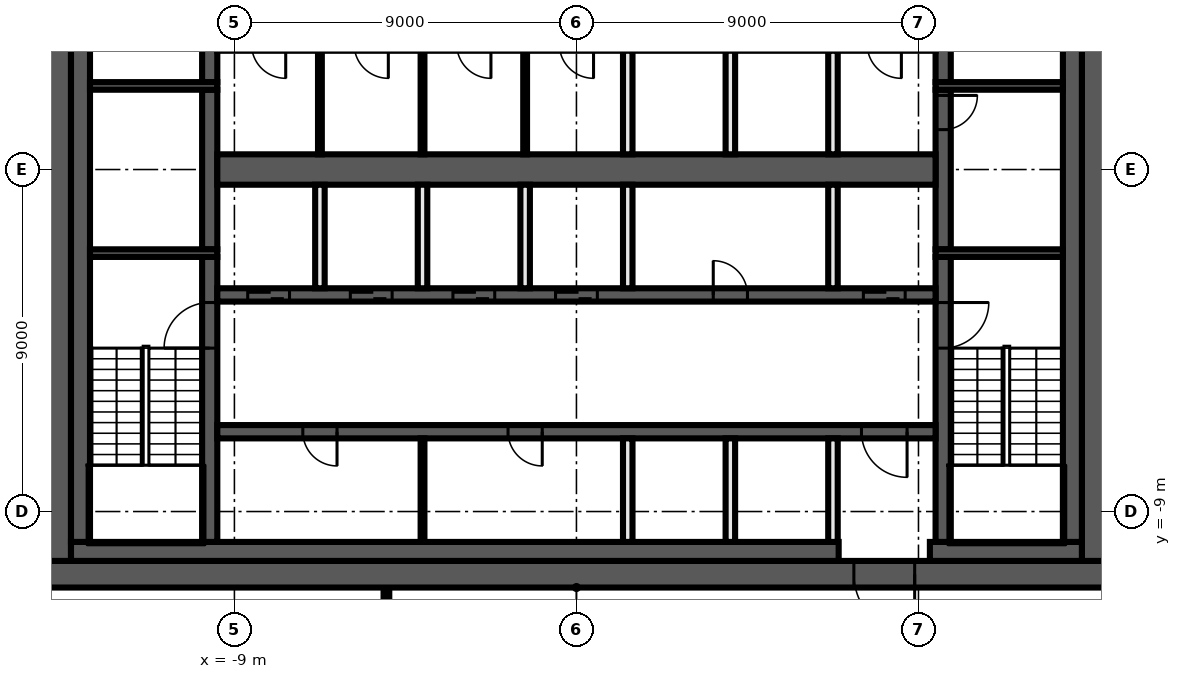
"""IFC4 building model, lengths in metres.
Left out: names, types, materials, properties, quantities, classifications, styles, units other than length and angle.
Written with IfcOpenShell. Run it as: python <this file> out.ifc"""

import sys

from ifc_helpers import new_model, si_unit, direction, frame, frame_2d, origin, place, context, subcontext, project, spatial, rectangle, extrude, element, fill, save


model = new_model("IFC4")
c1 = context("Model", 3, precision=1e-05, world=origin(), true_north=direction((0.0, 1.0)))
c2 = subcontext(c1, "Body", "Model", "MODEL_VIEW")
j1 = project(units=[si_unit("LENGTHUNIT", "METRE"), si_unit("PLANEANGLEUNIT", "RADIAN")], contexts=[c1])
p1 = place(None, origin())
s1 = spatial("IfcSite", under=j1, at=p1, CompositionType="ELEMENT")
p2 = place(p1, origin())
s2 = spatial("IfcBuilding", under=s1, at=p2, CompositionType="ELEMENT")
p3 = place(p2, frame((0.0, 0.0, 266.4)))
s3 = spatial("IfcBuildingStorey", under=s2, at=p3, CompositionType="ELEMENT", Elevation=266.4)
p4 = place(p3, frame((-5.0, -14.125, 0.0), z_axis=(0.0, 0.0, 1.0), x_axis=(0.0, 1.0, 0.0)))
e1 = element("IfcWall", 1, at=p4, inside=s3, PredefinedType="PARTITIONING", context=c2, shape_type="SweptSolid", body=[
    extrude(rectangle(XDim=3.125, YDim=0.15, at=frame_2d((1.562, 0.0))), origin(), (0.0, 0.0, 1.0), 3.82),
])
p5 = place(p3, frame((14.0, -10.65, 0.0), z_axis=(0.0, 0.0, 1.0), x_axis=(-1.0, 0.0, 0.0)))
e2 = element("IfcWall", 2, at=p5, inside=s3, PredefinedType="SHEAR", context=c2, shape_type="SweptSolid", body=[
    extrude(rectangle(XDim=28.0, YDim=0.7, at=frame_2d((14.0, 0.0))), origin(), (0.0, 0.0, 1.0), 3.82),
])
p6 = place(p5, frame((5.1, 0.0, 0.0)))
e3 = element("IfcOpeningElement", 3, at=p6, cuts=e2, PredefinedType="OPENING", context=c2, shape_type="SweptSolid", body=[
    extrude(rectangle(XDim=1.6, YDim=2.1, at=frame_2d((0.8, 1.05))), frame((0.0, 0.36, 0.0), z_axis=(0.0, -1.0, 0.0), x_axis=(1.0, 0.0, 0.0)), (0.0, 0.0, 1.0), 0.72),
])
for number, where, z_axis, x_axis in (
    (4, (13.65, 10.3, 0.0), (0.0, 0.0, 1.0), (0.0, -1.0, 0.0)),
    (5, (-13.65, -10.3, 0.0), (0.0, 0.0, 1.0), (0.0, 1.0, 0.0)),
):
    element("IfcWall", number, at=place(p3, frame(where, z_axis=z_axis, x_axis=x_axis)), inside=s3, PredefinedType="SHEAR", context=c2, shape_type="SweptSolid", body=[
        extrude(rectangle(XDim=20.6, YDim=0.7, at=frame_2d((10.3, 0.0))), origin(), (0.0, 0.0, 1.0), 3.82),
    ])
p7 = place(p3, frame((13.3, -10.05, 0.0), z_axis=(0.0, 0.0, 1.0), x_axis=(-1.0, 0.0, 0.0)))
e6 = element("IfcWall", 6, at=p7, inside=s3, PredefinedType="SHEAR", context=c2, shape_type="SweptSolid", body=[
    extrude(rectangle(XDim=4.0, YDim=0.5, at=frame_2d((2.0, 0.0))), origin(), (0.0, 0.0, 1.0), 3.82),
])
p8 = place(p3, frame((6.9, -10.05, 0.0), z_axis=(0.0, 0.0, 1.0), x_axis=(-1.0, 0.0, 0.0)))
e7 = element("IfcWall", 7, at=p8, inside=s3, PredefinedType="SHEAR", context=c2, shape_type="SweptSolid", body=[
    extrude(rectangle(XDim=20.2, YDim=0.5, at=frame_2d((10.1, 0.0))), origin(), (0.0, 0.0, 1.0), 3.82),
])
for number, where, z_axis, x_axis in (
    (8, (13.05, 9.8, 0.0), (0.0, 0.0, 1.0), (0.0, -1.0, 0.0)),
    (9, (-13.05, -9.8, 0.0), (0.0, 0.0, 1.0), (0.0, 1.0, 0.0)),
):
    element("IfcWall", number, at=place(p3, frame(where, z_axis=z_axis, x_axis=x_axis)), inside=s3, PredefinedType="SHEAR", context=c2, shape_type="SweptSolid", body=[
        extrude(rectangle(XDim=19.6, YDim=0.5, at=frame_2d((9.8, 0.0))), origin(), (0.0, 0.0, 1.0), 3.82),
    ])
p9 = place(p3, frame((9.65, -2.3, 0.0), z_axis=(0.0, 0.0, 1.0), x_axis=(0.0, -1.0, 0.0)))
e10 = element("IfcWall", 10, at=p9, inside=s3, PredefinedType="SHEAR", context=c2, shape_type="SweptSolid", body=[
    extrude(rectangle(XDim=7.5, YDim=0.4, at=frame_2d((3.75, 0.0))), origin(), (0.0, 0.0, 1.0), 3.82),
])
p10 = place(p9, frame((1.2, 0.0, 0.0)))
e11 = element("IfcOpeningElement", 11, at=p10, cuts=e10, PredefinedType="OPENING", context=c2, shape_type="SweptSolid", body=[
    extrude(rectangle(XDim=1.2, YDim=2.1, at=frame_2d((0.6, 1.05))), frame((0.0, 0.21, 0.0), z_axis=(0.0, -1.0, 0.0), x_axis=(1.0, 0.0, 0.0)), (0.0, 0.0, 1.0), 0.42),
])
p11 = place(p3, frame((9.65, 2.1, 0.0), z_axis=(0.0, 0.0, 1.0), x_axis=(0.0, -1.0, 0.0)))
e12 = element("IfcWall", 12, at=p11, inside=s3, PredefinedType="SHEAR", context=c2, shape_type="SweptSolid", body=[
    extrude(rectangle(XDim=4.2, YDim=0.4, at=frame_2d((2.1, 0.0))), origin(), (0.0, 0.0, 1.0), 3.82),
])
p12 = place(p11, frame((0.15, 0.0, 0.0)))
e13 = element("IfcOpeningElement", 13, at=p12, cuts=e12, PredefinedType="OPENING", context=c2, shape_type="SweptSolid", body=[
    extrude(rectangle(XDim=0.9, YDim=2.1, at=frame_2d((0.45, 1.05))), frame((0.0, 0.21, 0.0), z_axis=(0.0, -1.0, 0.0), x_axis=(1.0, 0.0, 0.0)), (0.0, 0.0, 1.0), 0.42),
])
p13 = place(p3, frame((9.65, 9.8, 0.0), z_axis=(0.0, 0.0, 1.0), x_axis=(0.0, -1.0, 0.0)))
e14 = element("IfcWall", 14, at=p13, inside=s3, PredefinedType="SHEAR", context=c2, shape_type="SweptSolid", body=[
    extrude(rectangle(XDim=7.5, YDim=0.4, at=frame_2d((3.75, 0.0))), origin(), (0.0, 0.0, 1.0), 3.82),
])
p14 = place(p13, frame((5.1, 0.0, 0.0)))
e15 = element("IfcOpeningElement", 15, at=p14, cuts=e14, PredefinedType="OPENING", context=c2, shape_type="SweptSolid", body=[
    extrude(rectangle(XDim=1.2, YDim=2.1, at=frame_2d((0.6, 1.05))), frame((0.0, 0.21, 0.0), z_axis=(0.0, -1.0, 0.0), x_axis=(1.0, 0.0, 0.0)), (0.0, 0.0, 1.0), 0.42),
])
p15 = place(p3, frame((-9.65, -9.8, 0.0), z_axis=(0.0, 0.0, 1.0), x_axis=(0.0, 1.0, 0.0)))
e16 = element("IfcWall", 16, at=p15, inside=s3, PredefinedType="SHEAR", context=c2, shape_type="SweptSolid", body=[
    extrude(rectangle(XDim=7.5, YDim=0.4, at=frame_2d((3.75, 0.0))), origin(), (0.0, 0.0, 1.0), 3.82),
])
p16 = place(p15, frame((5.1, 0.0, 0.0)))
e17 = element("IfcOpeningElement", 17, at=p16, cuts=e16, PredefinedType="OPENING", context=c2, shape_type="SweptSolid", body=[
    extrude(rectangle(XDim=1.2, YDim=2.1, at=frame_2d((0.6, 1.05))), frame((0.0, 0.21, 0.0), z_axis=(0.0, -1.0, 0.0), x_axis=(1.0, 0.0, 0.0)), (0.0, 0.0, 1.0), 0.42),
])
p17 = place(p3, frame((-9.65, -2.1, 0.0), z_axis=(0.0, 0.0, 1.0), x_axis=(0.0, 1.0, 0.0)))
e18 = element("IfcWall", 18, at=p17, inside=s3, PredefinedType="SHEAR", context=c2, shape_type="SweptSolid", body=[
    extrude(rectangle(XDim=4.2, YDim=0.4, at=frame_2d((2.1, 0.0))), origin(), (0.0, 0.0, 1.0), 3.82),
])
p18 = place(p3, frame((-9.65, 2.3, 0.0), z_axis=(0.0, 0.0, 1.0), x_axis=(0.0, 1.0, 0.0)))
e19 = element("IfcWall", 19, at=p18, inside=s3, PredefinedType="SHEAR", context=c2, shape_type="SweptSolid", body=[
    extrude(rectangle(XDim=7.5, YDim=0.4, at=frame_2d((3.75, 0.0))), origin(), (0.0, 0.0, 1.0), 3.82),
])
p19 = place(p18, frame((1.2, 0.0, 0.0)))
e20 = element("IfcOpeningElement", 20, at=p19, cuts=e19, PredefinedType="OPENING", context=c2, shape_type="SweptSolid", body=[
    extrude(rectangle(XDim=1.2, YDim=2.1, at=frame_2d((0.6, 1.05))), frame((0.0, 0.21, 0.0), z_axis=(0.0, -1.0, 0.0), x_axis=(1.0, 0.0, 0.0)), (0.0, 0.0, 1.0), 0.42),
])
for number, where, z_axis, x_axis in (
    (21, (9.45, 2.2, 0.0), (0.0, 0.0, 1.0), (1.0, 0.0, 0.0)),
    (22, (-9.45, 2.2, 0.0), (0.0, 0.0, 1.0), (-1.0, 0.0, 0.0)),
    (23, (9.45, -2.2, 0.0), (0.0, 0.0, 1.0), (1.0, 0.0, 0.0)),
    (24, (-9.45, -2.2, 0.0), (0.0, 0.0, 1.0), (-1.0, 0.0, 0.0)),
):
    element("IfcWall", number, at=place(p3, frame(where, z_axis=z_axis, x_axis=x_axis)), inside=s3, PredefinedType="SHEAR", context=c2, shape_type="SweptSolid", body=[
        extrude(rectangle(XDim=3.35, YDim=0.2, at=frame_2d((1.675, 0.0))), origin(), (0.0, 0.0, 1.0), 3.82),
    ])
p20 = place(p3, frame((-9.45, -3.3, 0.0), z_axis=(0.0, 0.0, 1.0), x_axis=(1.0, 0.0, 0.0)))
e25 = element("IfcWall", 25, at=p20, inside=s3, PredefinedType="SHEAR", context=c2, shape_type="SweptSolid", body=[
    extrude(rectangle(XDim=18.9, YDim=0.35, at=frame_2d((9.45, 0.0))), origin(), (0.0, 0.0, 1.0), 3.82),
])
p21 = place(p20, frame((0.8, 0.0, 0.0)))
e26 = element("IfcOpeningElement", 26, at=p21, cuts=e25, PredefinedType="OPENING", context=c2, shape_type="SweptSolid", body=[
    extrude(rectangle(XDim=1.1, YDim=2.1, at=frame_2d((0.55, 1.05))), frame((0.0, 0.185, 0.0), z_axis=(0.0, -1.0, 0.0), x_axis=(1.0, 0.0, 0.0)), (0.0, 0.0, 1.0), 0.37),
])
p22 = place(p20, frame((3.5, 0.0, 0.0)))
e27 = element("IfcOpeningElement", 27, at=p22, cuts=e25, PredefinedType="OPENING", context=c2, shape_type="SweptSolid", body=[
    extrude(rectangle(XDim=1.1, YDim=2.1, at=frame_2d((0.55, 1.05))), frame((0.0, 0.185, 0.0), z_axis=(0.0, -1.0, 0.0), x_axis=(1.0, 0.0, 0.0)), (0.0, 0.0, 1.0), 0.37),
])
p23 = place(p20, frame((6.2, 0.0, 0.0)))
e28 = element("IfcOpeningElement", 28, at=p23, cuts=e25, PredefinedType="OPENING", context=c2, shape_type="SweptSolid", body=[
    extrude(rectangle(XDim=1.1, YDim=2.1, at=frame_2d((0.55, 1.05))), frame((0.0, 0.185, 0.0), z_axis=(0.0, -1.0, 0.0), x_axis=(1.0, 0.0, 0.0)), (0.0, 0.0, 1.0), 0.37),
])
p24 = place(p20, frame((8.9, 0.0, 0.0)))
e29 = element("IfcOpeningElement", 29, at=p24, cuts=e25, PredefinedType="OPENING", context=c2, shape_type="SweptSolid", body=[
    extrude(rectangle(XDim=1.1, YDim=2.1, at=frame_2d((0.55, 1.05))), frame((0.0, 0.185, 0.0), z_axis=(0.0, -1.0, 0.0), x_axis=(1.0, 0.0, 0.0)), (0.0, 0.0, 1.0), 0.37),
])
p25 = place(p20, frame((17.0, 0.0, 0.0)))
e30 = element("IfcOpeningElement", 30, at=p25, cuts=e25, PredefinedType="OPENING", context=c2, shape_type="SweptSolid", body=[
    extrude(rectangle(XDim=1.1, YDim=2.1, at=frame_2d((0.55, 1.05))), frame((0.0, 0.185, 0.0), z_axis=(0.0, -1.0, 0.0), x_axis=(1.0, 0.0, 0.0)), (0.0, 0.0, 1.0), 0.37),
])
p26 = place(p20, frame((13.05, 0.0, 0.0)))
e31 = element("IfcOpeningElement", 31, at=p26, cuts=e25, PredefinedType="OPENING", context=c2, shape_type="SweptSolid", body=[
    extrude(rectangle(XDim=0.9, YDim=2.1, at=frame_2d((0.45, 1.05))), frame((0.0, 0.185, 0.0), z_axis=(0.0, -1.0, 0.0), x_axis=(1.0, 0.0, 0.0)), (0.0, 0.0, 1.0), 0.37),
])
p27 = place(p3, frame((9.45, -6.9, 0.0), z_axis=(0.0, 0.0, 1.0), x_axis=(-1.0, 0.0, 0.0)))
e32 = element("IfcWall", 32, at=p27, inside=s3, PredefinedType="SHEAR", context=c2, shape_type="SweptSolid", body=[
    extrude(rectangle(XDim=18.9, YDim=0.35, at=frame_2d((9.45, 0.0))), origin(), (0.0, 0.0, 1.0), 3.82),
])
p28 = place(p27, frame((0.75, 0.0, 0.0)))
e33 = element("IfcOpeningElement", 33, at=p28, cuts=e32, PredefinedType="OPENING", context=c2, shape_type="SweptSolid", body=[
    extrude(rectangle(XDim=1.2, YDim=2.1, at=frame_2d((0.6, 1.05))), frame((0.0, 0.185, 0.0), z_axis=(0.0, -1.0, 0.0), x_axis=(1.0, 0.0, 0.0)), (0.0, 0.0, 1.0), 0.37),
])
p29 = place(p27, frame((15.75, 0.0, 0.0)))
e34 = element("IfcOpeningElement", 34, at=p29, cuts=e32, PredefinedType="OPENING", context=c2, shape_type="SweptSolid", body=[
    extrude(rectangle(XDim=0.9, YDim=2.1, at=frame_2d((0.45, 1.05))), frame((0.0, 0.185, 0.0), z_axis=(0.0, -1.0, 0.0), x_axis=(1.0, 0.0, 0.0)), (0.0, 0.0, 1.0), 0.37),
])
p30 = place(p27, frame((10.35, 0.0, 0.0)))
e35 = element("IfcOpeningElement", 35, at=p30, cuts=e32, PredefinedType="OPENING", context=c2, shape_type="SweptSolid", body=[
    extrude(rectangle(XDim=0.9, YDim=2.1, at=frame_2d((0.45, 1.05))), frame((0.0, 0.185, 0.0), z_axis=(0.0, -1.0, 0.0), x_axis=(1.0, 0.0, 0.0)), (0.0, 0.0, 1.0), 0.37),
])
p31 = place(p3, frame((-9.45, 0.0, 0.0), z_axis=(0.0, 0.0, 1.0), x_axis=(1.0, 0.0, 0.0)))
e36 = element("IfcWall", 36, at=p31, inside=s3, PredefinedType="SHEAR", context=c2, shape_type="SweptSolid", body=[
    extrude(rectangle(XDim=18.9, YDim=0.8, at=frame_2d((9.45, 0.0))), origin(), (0.0, 0.0, 1.0), 3.82),
])
for number, where, z_axis, x_axis in (
    (37, (6.75, -9.8, 0.0), (0.0, 0.0, 1.0), (0.0, 1.0, 0.0)),
    (38, (6.75, -3.125, 0.0), (0.0, 0.0, 1.0), (0.0, 1.0, 0.0)),
    (39, (6.75, 0.4, 0.0), (0.0, 0.0, 1.0), (0.0, 1.0, 0.0)),
    (40, (4.05, -9.8, 0.0), (0.0, 0.0, 1.0), (0.0, 1.0, 0.0)),
    (41, (4.05, 0.4, 0.0), (0.0, 0.0, 1.0), (0.0, 1.0, 0.0)),
    (42, (1.35, -9.8, 0.0), (0.0, 0.0, 1.0), (0.0, 1.0, 0.0)),
    (43, (1.35, -3.125, 0.0), (0.0, 0.0, 1.0), (0.0, 1.0, 0.0)),
    (44, (1.35, 0.4, 0.0), (0.0, 0.0, 1.0), (0.0, 1.0, 0.0)),
):
    element("IfcWall", number, at=place(p3, frame(where, z_axis=z_axis, x_axis=x_axis)), inside=s3, PredefinedType="SOLIDWALL", context=c2, shape_type="SweptSolid", body=[
        extrude(rectangle(XDim=2.725, YDim=0.25, at=frame_2d((1.363, 0.0))), origin(), (0.0, 0.0, 1.0), 3.82),
    ])
p32 = place(p3, frame((-1.35, 0.4, 0.0), z_axis=(0.0, 0.0, 1.0), x_axis=(0.0, 1.0, 0.0)))
e45 = element("IfcWall", 45, at=p32, inside=s3, PredefinedType="PARTITIONING", context=c2, shape_type="SweptSolid", body=[
    extrude(rectangle(XDim=2.725, YDim=0.1, at=frame_2d((1.363, 0.0))), origin(), (0.0, 0.0, 1.0), 3.82),
])
p33 = place(p3, frame((-1.35, -3.125, 0.0), z_axis=(0.0, 0.0, 1.0), x_axis=(0.0, 1.0, 0.0)))
e46 = element("IfcWall", 46, at=p33, inside=s3, PredefinedType="SOLIDWALL", context=c2, shape_type="SweptSolid", body=[
    extrude(rectangle(XDim=2.725, YDim=0.25, at=frame_2d((1.363, 0.0))), origin(), (0.0, 0.0, 1.0), 3.82),
])
for number, where, z_axis, x_axis in (
    (47, (-4.05, -9.8, 0.0), (0.0, 0.0, 1.0), (0.0, 1.0, 0.0)),
    (48, (-4.05, 0.4, 0.0), (0.0, 0.0, 1.0), (0.0, 1.0, 0.0)),
):
    element("IfcWall", number, at=place(p3, frame(where, z_axis=z_axis, x_axis=x_axis)), inside=s3, PredefinedType="PARTITIONING", context=c2, shape_type="SweptSolid", body=[
        extrude(rectangle(XDim=2.725, YDim=0.1, at=frame_2d((1.363, 0.0))), origin(), (0.0, 0.0, 1.0), 3.82),
    ])
p34 = place(p3, frame((-4.05, -3.125, 0.0), z_axis=(0.0, 0.0, 1.0), x_axis=(0.0, 1.0, 0.0)))
e49 = element("IfcWall", 49, at=p34, inside=s3, PredefinedType="SOLIDWALL", context=c2, shape_type="SweptSolid", body=[
    extrude(rectangle(XDim=2.725, YDim=0.25, at=frame_2d((1.363, 0.0))), origin(), (0.0, 0.0, 1.0), 3.82),
])
p35 = place(p3, frame((-6.75, 0.4, 0.0), z_axis=(0.0, 0.0, 1.0), x_axis=(0.0, 1.0, 0.0)))
e50 = element("IfcWall", 50, at=p35, inside=s3, PredefinedType="PARTITIONING", context=c2, shape_type="SweptSolid", body=[
    extrude(rectangle(XDim=2.725, YDim=0.1, at=frame_2d((1.363, 0.0))), origin(), (0.0, 0.0, 1.0), 3.82),
])
p36 = place(p3, frame((-6.75, -3.125, 0.0), z_axis=(0.0, 0.0, 1.0), x_axis=(0.0, 1.0, 0.0)))
e51 = element("IfcWall", 51, at=p36, inside=s3, PredefinedType="SOLIDWALL", context=c2, shape_type="SweptSolid", body=[
    extrude(rectangle(XDim=2.725, YDim=0.25, at=frame_2d((1.363, 0.0))), origin(), (0.0, 0.0, 1.0), 3.82),
])
p37 = place(p12, origin())
e52 = element("IfcDoor", 52, at=p37, inside=s3, OperationType="SINGLE_SWING_RIGHT", PredefinedType="DOOR", context=c2, shape_type="SweptSolid", body=[
    extrude(rectangle(XDim=0.9, YDim=2.1, at=frame_2d((0.45, 1.05))), frame((0.0, 0.025, 0.0), z_axis=(0.0, -1.0, 0.0), x_axis=(1.0, 0.0, 0.0)), (0.0, 0.0, 1.0), 0.05),
])
fill(e13, e52)
p38 = place(p21, origin())
e53 = element("IfcDoor", 53, at=p38, inside=s3, OperationType="DOUBLE_DOOR_SLIDING", PredefinedType="DOOR", context=c2, shape_type="SweptSolid", body=[
    extrude(rectangle(XDim=1.1, YDim=2.1, at=frame_2d((0.55, 1.05))), frame((0.0, 0.025, 0.0), z_axis=(0.0, -1.0, 0.0), x_axis=(1.0, 0.0, 0.0)), (0.0, 0.0, 1.0), 0.05),
])
fill(e26, e53)
p39 = place(p22, origin())
e54 = element("IfcDoor", 54, at=p39, inside=s3, OperationType="DOUBLE_DOOR_SLIDING", PredefinedType="DOOR", context=c2, shape_type="SweptSolid", body=[
    extrude(rectangle(XDim=1.1, YDim=2.1, at=frame_2d((0.55, 1.05))), frame((0.0, 0.025, 0.0), z_axis=(0.0, -1.0, 0.0), x_axis=(1.0, 0.0, 0.0)), (0.0, 0.0, 1.0), 0.05),
])
fill(e27, e54)
p40 = place(p23, origin())
e55 = element("IfcDoor", 55, at=p40, inside=s3, OperationType="DOUBLE_DOOR_SLIDING", PredefinedType="DOOR", context=c2, shape_type="SweptSolid", body=[
    extrude(rectangle(XDim=1.1, YDim=2.1, at=frame_2d((0.55, 1.05))), frame((0.0, 0.025, 0.0), z_axis=(0.0, -1.0, 0.0), x_axis=(1.0, 0.0, 0.0)), (0.0, 0.0, 1.0), 0.05),
])
fill(e28, e55)
p41 = place(p24, origin())
e56 = element("IfcDoor", 56, at=p41, inside=s3, OperationType="DOUBLE_DOOR_SLIDING", PredefinedType="DOOR", context=c2, shape_type="SweptSolid", body=[
    extrude(rectangle(XDim=1.1, YDim=2.1, at=frame_2d((0.55, 1.05))), frame((0.0, 0.025, 0.0), z_axis=(0.0, -1.0, 0.0), x_axis=(1.0, 0.0, 0.0)), (0.0, 0.0, 1.0), 0.05),
])
fill(e29, e56)
p42 = place(p25, origin())
e57 = element("IfcDoor", 57, at=p42, inside=s3, OperationType="DOUBLE_DOOR_SLIDING", PredefinedType="DOOR", context=c2, shape_type="SweptSolid", body=[
    extrude(rectangle(XDim=1.1, YDim=2.1, at=frame_2d((0.55, 1.05))), frame((0.0, 0.025, 0.0), z_axis=(0.0, -1.0, 0.0), x_axis=(1.0, 0.0, 0.0)), (0.0, 0.0, 1.0), 0.05),
])
fill(e30, e57)
p43 = place(p6, origin())
e58 = element("IfcDoor", 58, at=p43, inside=s3, OperationType="DOUBLE_DOOR_SINGLE_SWING", PredefinedType="DOOR", context=c2, shape_type="SweptSolid", body=[
    extrude(rectangle(XDim=1.6, YDim=2.1, at=frame_2d((0.8, 1.05))), frame((0.0, 0.025, 0.0), z_axis=(0.0, -1.0, 0.0), x_axis=(1.0, 0.0, 0.0)), (0.0, 0.0, 1.0), 0.05),
])
fill(e3, e58)
p44 = place(p28, origin())
e59 = element("IfcDoor", 59, at=p44, inside=s3, OperationType="SINGLE_SWING_LEFT", PredefinedType="DOOR", context=c2, shape_type="SweptSolid", body=[
    extrude(rectangle(XDim=1.2, YDim=2.1, at=frame_2d((0.6, 1.05))), frame((0.0, 0.025, 0.0), z_axis=(0.0, -1.0, 0.0), x_axis=(1.0, 0.0, 0.0)), (0.0, 0.0, 1.0), 0.05),
])
fill(e33, e59)
p45 = place(p26, origin())
e60 = element("IfcDoor", 60, at=p45, inside=s3, OperationType="SINGLE_SWING_RIGHT", PredefinedType="DOOR", context=c2, shape_type="SweptSolid", body=[
    extrude(rectangle(XDim=0.9, YDim=2.1, at=frame_2d((0.45, 1.05))), frame((0.0, 0.025, 0.0), z_axis=(0.0, -1.0, 0.0), x_axis=(1.0, 0.0, 0.0)), (0.0, 0.0, 1.0), 0.05),
])
fill(e31, e60)
p46 = place(p29, origin())
e61 = element("IfcDoor", 61, at=p46, inside=s3, OperationType="SINGLE_SWING_LEFT", PredefinedType="DOOR", context=c2, shape_type="SweptSolid", body=[
    extrude(rectangle(XDim=0.9, YDim=2.1, at=frame_2d((0.45, 1.05))), frame((0.0, 0.025, 0.0), z_axis=(0.0, -1.0, 0.0), x_axis=(1.0, 0.0, 0.0)), (0.0, 0.0, 1.0), 0.05),
])
fill(e34, e61)
p47 = place(p30, origin())
e62 = element("IfcDoor", 62, at=p47, inside=s3, OperationType="SINGLE_SWING_RIGHT", PredefinedType="DOOR", context=c2, shape_type="SweptSolid", body=[
    extrude(rectangle(XDim=0.9, YDim=2.1, at=frame_2d((0.45, 1.05))), frame((0.0, 0.025, 0.0), z_axis=(0.0, -1.0, 0.0), x_axis=(1.0, 0.0, 0.0)), (0.0, 0.0, 1.0), 0.05),
])
fill(e35, e62)
p48 = place(p10, origin())
e63 = element("IfcDoor", 63, at=p48, inside=s3, OperationType="SINGLE_SWING_RIGHT", PredefinedType="DOOR", context=c2, shape_type="SweptSolid", body=[
    extrude(rectangle(XDim=1.2, YDim=2.1, at=frame_2d((0.6, 1.05))), frame((0.0, 0.025, 0.0), z_axis=(0.0, -1.0, 0.0), x_axis=(1.0, 0.0, 0.0)), (0.0, 0.0, 1.0), 0.05),
])
fill(e11, e63)
p49 = place(p16, origin())
e64 = element("IfcDoor", 64, at=p49, inside=s3, OperationType="SINGLE_SWING_LEFT", PredefinedType="DOOR", context=c2, shape_type="SweptSolid", body=[
    extrude(rectangle(XDim=1.2, YDim=2.1, at=frame_2d((0.6, 1.05))), frame((0.0, 0.025, 0.0), z_axis=(0.0, -1.0, 0.0), x_axis=(1.0, 0.0, 0.0)), (0.0, 0.0, 1.0), 0.05),
])
fill(e17, e64)
save(model, sys.argv[1])
